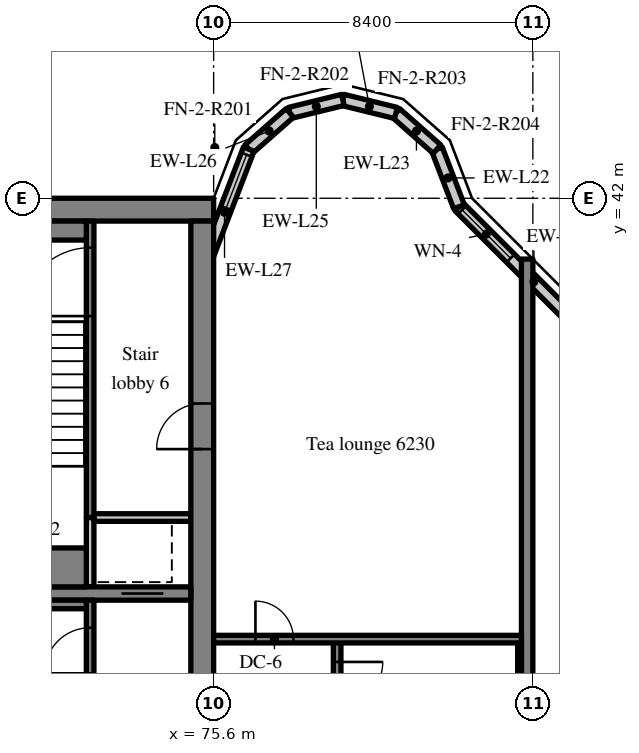
"""IFC4 building model, lengths in metres.
Left out: names, types, materials, properties, quantities, classifications, styles, units other than length and angle.
Written with IfcOpenShell. Run it as: python <this file> out.ifc"""

import sys

from ifc_helpers import new_model, si_unit, direction, frame, frame_2d, origin, place, context, subcontext, project, spatial, rectangle, extrude, source, transform, mapped, element, fill, save


model = new_model("IFC4")
c1 = context("Model", 3, precision=1e-05, world=origin(), true_north=direction((0.0, 1.0)))
c2 = subcontext(c1, "Body", "Model", "MODEL_VIEW")
j1 = project(units=[si_unit("LENGTHUNIT", "METRE"), si_unit("PLANEANGLEUNIT", "RADIAN")], contexts=[c1])
p1 = place(None, origin())
s1 = spatial("IfcSite", under=j1, at=p1, CompositionType="ELEMENT")
p2 = place(p1, origin())
s2 = spatial("IfcBuilding", under=s1, at=p2, CompositionType="ELEMENT")
p3 = place(p2, frame((0.0, 0.0, 256.9)))
s3 = spatial("IfcBuildingStorey", under=s2, at=p3, CompositionType="ELEMENT", Elevation=256.9)
m1 = source(origin(), c2, "Body", "SweptSolid", [
    extrude(rectangle(XDim=50.4, YDim=0.6, at=frame_2d((25.2, 0.0))), origin(), (0.0, 0.0, 1.0), 3.62),
])
p4 = place(p3, frame((25.2, 41.7, 0.0), z_axis=(0.0, 0.0, 1.0), x_axis=(1.0, 0.0, 0.0)))
e1 = element("IfcWall", 1, at=p4, inside=s3, PredefinedType="SHEAR", context=c2, shape_type="MappedRepresentation", body=[
    mapped(m1, transform((0.0, 0.0, 0.0), scale=1.0)),
])
m2 = source(origin(), c2, "Body", "SweptSolid", [
    extrude(rectangle(XDim=18.8, YDim=0.6, at=frame_2d((9.4, 0.0))), origin(), (0.0, 0.0, 1.0), 3.62),
])
p5 = place(p3, frame((75.3, 22.6, 0.0), z_axis=(0.0, 0.0, 1.0), x_axis=(0.0, 1.0, 0.0)))
e2 = element("IfcWall", 2, at=p5, inside=s3, PredefinedType="SHEAR", context=c2, shape_type="MappedRepresentation", body=[
    mapped(m2, transform((0.0, 0.0, 0.0), scale=1.0)),
])
m3 = source(origin(), c2, "Body", "SweptSolid", [
    extrude(rectangle(XDim=1.2, YDim=2.1, at=frame_2d((0.6, 1.05))), frame((0.0, 0.31, 0.0), z_axis=(0.0, -1.0, 0.0), x_axis=(1.0, 0.0, 0.0)), (0.0, 0.0, 1.0), 0.62),
])
p6 = place(p5, frame((12.8, 0.0, 0.0)))
e3 = element("IfcOpeningElement", 3, at=p6, cuts=e2, PredefinedType="OPENING", context=c2, shape_type="MappedRepresentation", body=[
    mapped(m3, transform((0.0, 0.0, 0.0), scale=1.0)),
])
m4 = source(origin(), c2, "Body", "SweptSolid", [
    extrude(rectangle(XDim=7.625, YDim=0.35, at=frame_2d((3.812, 0.0))), origin(), (0.0, 0.0, 1.0), 3.62),
])
p7 = place(p3, frame((67.375, 31.6, 0.0), z_axis=(0.0, 0.0, 1.0), x_axis=(1.0, 0.0, 0.0)))
e4 = element("IfcWall", 4, at=p7, inside=s3, PredefinedType="SHEAR", context=c2, shape_type="MappedRepresentation", body=[
    mapped(m4, transform((0.0, 0.0, 0.0), scale=1.0)),
])
m5 = source(origin(), c2, "Body", "SweptSolid", [
    extrude(rectangle(XDim=1.1, YDim=2.1, at=frame_2d((0.55, 1.05))), frame((0.0, 0.185, 0.0), z_axis=(0.0, -1.0, 0.0), x_axis=(1.0, 0.0, 0.0)), (0.0, 0.0, 1.0), 0.37),
])
p8 = place(p7, frame((5.8, 0.0, 0.0)))
e5 = element("IfcOpeningElement", 5, at=p8, cuts=e4, PredefinedType="OPENING", context=c2, shape_type="MappedRepresentation", body=[
    mapped(m5, transform((0.0, 0.0, 0.0), scale=1.0)),
])
m6 = source(origin(), c2, "Body", "SweptSolid", [
    extrude(rectangle(XDim=18.4, YDim=0.3, at=frame_2d((9.2, 0.0))), origin(), (0.0, 0.0, 1.0), 3.62),
])
p9 = place(p3, frame((83.85, 22.0, 0.0), z_axis=(0.0, 0.0, 1.0), x_axis=(0.0, 1.0, 0.0)))
e6 = element("IfcWall", 6, at=p9, inside=s3, PredefinedType="SHEAR", context=c2, shape_type="MappedRepresentation", body=[
    mapped(m6, transform((0.0, 0.0, 0.0), scale=1.0)),
])
m7 = source(origin(), c2, "Body", "SweptSolid", [
    extrude(rectangle(XDim=5.576, YDim=0.3, at=frame_2d((2.788, 0.0))), origin(), (0.0, 0.0, 1.0), 3.62),
])
p10 = place(p3, frame((86.0, 37.834, 0.0), z_axis=(0.0, 0.0, 1.0), x_axis=(-0.707106781187, 0.707106781187, 0.0)))
e7 = element("IfcWall", 7, at=p10, inside=s3, PredefinedType="SOLIDWALL", context=c2, shape_type="MappedRepresentation", body=[
    mapped(m7, transform((0.0, 0.0, 0.0), scale=1.0)),
])
m8 = source(origin(), c2, "Body", "SweptSolid", [
    extrude(rectangle(XDim=1.8, YDim=1.5, at=frame_2d((0.9, 0.75))), frame((0.0, 0.16, 0.0), z_axis=(0.0, -1.0, 0.0), x_axis=(1.0, 0.0, 0.0)), (0.0, 0.0, 1.0), 0.32),
])
p11 = place(p10, frame((3.658, 0.0, 0.9)))
e8 = element("IfcOpeningElement", 8, at=p11, cuts=e7, PredefinedType="OPENING", context=c2, shape_type="MappedRepresentation", body=[
    mapped(m8, transform((0.0, 0.0, 0.0), scale=1.0)),
])
m9 = source(origin(), c2, "Body", "SweptSolid", [
    extrude(rectangle(XDim=1.622, YDim=0.3, at=frame_2d((0.811, 0.0))), origin(), (0.0, 0.0, 1.0), 3.62),
])
p12 = place(p3, frame((82.057, 41.777, 0.0), z_axis=(0.0, 0.0, 1.0), x_axis=(-0.357778527068, 0.933806471154, 0.0)))
e9 = element("IfcWall", 9, at=p12, inside=s3, PredefinedType="SOLIDWALL", context=c2, shape_type="MappedRepresentation", body=[
    mapped(m9, transform((0.0, 0.0, 0.0), scale=1.0)),
])
m10 = source(origin(), c2, "Body", "SweptSolid", [
    extrude(rectangle(XDim=1.44, YDim=0.3, at=frame_2d((0.72, 0.0))), origin(), (0.0, 0.0, 1.0), 3.62),
])
p13 = place(p3, frame((81.477, 43.292, 0.0), z_axis=(0.0, 0.0, 1.0), x_axis=(-0.74957555648, 0.661918790432, 0.0)))
e10 = element("IfcWall", 10, at=p13, inside=s3, PredefinedType="SOLIDWALL", context=c2, shape_type="MappedRepresentation", body=[
    mapped(m10, transform((0.0, 0.0, 0.0), scale=1.0)),
])
m11 = source(origin(), c2, "Body", "SweptSolid", [
    extrude(rectangle(XDim=1.439, YDim=0.3, at=frame_2d((0.719, 0.0))), origin(), (0.0, 0.0, 1.0), 3.62),
])
for number, where, z_axis, x_axis in (
    (11, (80.397, 44.245, 0.0), (0.0, 0.0, 1.0), (-0.971, 0.238, 0.0)),
    (12, (79.0, 44.588, 0.0), (0.0, 0.0, 1.0), (-0.971, -0.238, 0.0)),
):
    element("IfcWall", number, at=place(p3, frame(where, z_axis=z_axis, x_axis=x_axis)), inside=s3, PredefinedType="SOLIDWALL", context=c2, shape_type="MappedRepresentation", body=[
        mapped(m11, transform((0.0, 0.0, 0.0), scale=1.0)),
    ])
p14 = place(p3, frame((77.603, 44.245, 0.0), z_axis=(0.0, 0.0, 1.0), x_axis=(-0.74957555648, -0.661918790432, 0.0)))
e13 = element("IfcWall", 13, at=p14, inside=s3, PredefinedType="SOLIDWALL", context=c2, shape_type="MappedRepresentation", body=[
    mapped(m10, transform((0.0, 0.0, 0.0), scale=1.0)),
])
m12 = source(origin(), c2, "Body", "SweptSolid", [
    extrude(rectangle(XDim=3.559, YDim=0.3, at=frame_2d((1.78, 0.0))), origin(), (0.0, 0.0, 1.0), 3.62),
])
p15 = place(p3, frame((76.523, 43.292, 0.0), z_axis=(0.0, 0.0, 1.0), x_axis=(-0.35779745313, -0.933799219604, 0.0)))
e14 = element("IfcWall", 14, at=p15, inside=s3, PredefinedType="SOLIDWALL", context=c2, shape_type="MappedRepresentation", body=[
    mapped(m12, transform((0.0, 0.0, 0.0), scale=1.0)),
])
m13 = source(origin(), c2, "Body", "SweptSolid", [
    extrude(rectangle(XDim=1.5, YDim=2.0, at=frame_2d((0.75, 1.0))), frame((0.0, 0.16, 0.0), z_axis=(0.0, -1.0, 0.0), x_axis=(1.0, 0.0, 0.0)), (0.0, 0.0, 1.0), 0.32),
])
p16 = place(p15, frame((0.156, 0.0, 0.9)))
e15 = element("IfcOpeningElement", 15, at=p16, cuts=e14, PredefinedType="OPENING", context=c2, shape_type="MappedRepresentation", body=[
    mapped(m13, transform((0.0, 0.0, 0.0), scale=1.0)),
])
m14 = source(origin(), c2, "Body", "SweptSolid", [
    extrude(rectangle(XDim=8.825, YDim=0.2, at=frame_2d((4.413, 0.0))), origin(), (0.0, 0.0, 1.0), 3.62),
])
p17 = place(p3, frame((72.35, 22.6, 0.0), z_axis=(0.0, 0.0, 1.0), x_axis=(0.0, 1.0, 0.0)))
e16 = element("IfcWall", 16, at=p17, inside=s3, PredefinedType="SOLIDWALL", context=c2, shape_type="MappedRepresentation", body=[
    mapped(m14, transform((0.0, 0.0, 0.0), scale=1.0)),
])
m15 = source(origin(), c2, "Body", "SweptSolid", [
    extrude(rectangle(XDim=1.2, YDim=2.1, at=frame_2d((0.6, 1.05))), frame((0.0, 0.11, 0.0), z_axis=(0.0, -1.0, 0.0), x_axis=(1.0, 0.0, 0.0)), (0.0, 0.0, 1.0), 0.22),
])
p18 = place(p17, frame((6.9, 0.0, 0.0)))
e17 = element("IfcOpeningElement", 17, at=p18, cuts=e16, PredefinedType="OPENING", context=c2, shape_type="MappedRepresentation", body=[
    mapped(m15, transform((0.0, 0.0, 0.0), scale=1.0)),
])
m16 = source(origin(), c2, "Body", "SweptSolid", [
    extrude(rectangle(XDim=1.825, YDim=0.2, at=frame_2d((0.913, 0.0))), origin(), (0.0, 0.0, 1.0), 3.62),
])
p19 = place(p3, frame((72.35, 31.775, 0.0), z_axis=(0.0, 0.0, 1.0), x_axis=(0.0, 1.0, 0.0)))
e18 = element("IfcWall", 18, at=p19, inside=s3, PredefinedType="SOLIDWALL", context=c2, shape_type="MappedRepresentation", body=[
    mapped(m16, transform((0.0, 0.0, 0.0), scale=1.0)),
])
m17 = source(origin(), c2, "Body", "SweptSolid", [
    extrude(rectangle(XDim=2.55, YDim=0.2, at=frame_2d((1.275, 0.0))), origin(), (0.0, 0.0, 1.0), 3.62),
])
p20 = place(p3, frame((72.45, 33.6, 0.0), z_axis=(0.0, 0.0, 1.0), x_axis=(1.0, 0.0, 0.0)))
e19 = element("IfcWall", 19, at=p20, inside=s3, PredefinedType="SOLIDWALL", context=c2, shape_type="MappedRepresentation", body=[
    mapped(m17, transform((0.0, 0.0, 0.0), scale=1.0)),
])
m18 = source(origin(), c2, "Body", "SweptSolid", [
    extrude(rectangle(XDim=7.8, YDim=0.2, at=frame_2d((3.9, 0.0))), origin(), (0.0, 0.0, 1.0), 3.62),
])
p21 = place(p3, frame((72.35, 33.6, 0.0), z_axis=(0.0, 0.0, 1.0), x_axis=(0.0, 1.0, 0.0)))
e20 = element("IfcWall", 20, at=p21, inside=s3, PredefinedType="SOLIDWALL", context=c2, shape_type="MappedRepresentation", body=[
    mapped(m18, transform((0.0, 0.0, 0.0), scale=1.0)),
])
m19 = source(origin(), c2, "Body", "SweptSolid", [
    extrude(rectangle(XDim=1.8, YDim=2.1, at=frame_2d((0.9, 1.05))), frame((0.0, 0.11, 0.0), z_axis=(0.0, -1.0, 0.0), x_axis=(1.0, 0.0, 0.0)), (0.0, 0.0, 1.0), 0.22),
])
p22 = place(p21, frame((5.3, 0.0, 0.0)))
e21 = element("IfcOpeningElement", 21, at=p22, cuts=e20, PredefinedType="OPENING", context=c2, shape_type="MappedRepresentation", body=[
    mapped(m19, transform((0.0, 0.0, 0.0), scale=1.0)),
])
m20 = source(origin(), c2, "Body", "SweptSolid", [
    extrude(rectangle(XDim=8.3, YDim=0.2, at=frame_2d((4.15, 0.0))), origin(), (0.0, 0.0, 1.0), 3.62),
])
p23 = place(p3, frame((78.85, 22.1, 0.0), z_axis=(0.0, 0.0, 1.0), x_axis=(0.0, 1.0, 0.0)))
e22 = element("IfcWall", 22, at=p23, inside=s3, PredefinedType="SOLIDWALL", context=c2, shape_type="MappedRepresentation", body=[
    mapped(m20, transform((0.0, 0.0, 0.0), scale=1.0)),
])
p24 = place(p23, frame((6.5, 0.0, 0.0)))
e23 = element("IfcOpeningElement", 23, at=p24, cuts=e22, PredefinedType="OPENING", context=c2, shape_type="MappedRepresentation", body=[
    mapped(m15, transform((0.0, 0.0, 0.0), scale=1.0)),
])
m21 = source(origin(), c2, "Body", "SweptSolid", [
    extrude(rectangle(XDim=8.1, YDim=0.2, at=frame_2d((4.05, 0.0))), origin(), (0.0, 0.0, 1.0), 3.62),
])
p25 = place(p3, frame((83.7, 30.4, 0.0), z_axis=(0.0, 0.0, 1.0), x_axis=(-1.0, 0.0, 0.0)))
e24 = element("IfcWall", 24, at=p25, inside=s3, PredefinedType="SOLIDWALL", context=c2, shape_type="MappedRepresentation", body=[
    mapped(m21, transform((0.0, 0.0, 0.0), scale=1.0)),
])
m22 = source(origin(), c2, "Body", "SweptSolid", [
    extrude(rectangle(XDim=1.0, YDim=2.1, at=frame_2d((0.5, 1.05))), frame((0.0, 0.11, 0.0), z_axis=(0.0, -1.0, 0.0), x_axis=(1.0, 0.0, 0.0)), (0.0, 0.0, 1.0), 0.22),
])
p26 = place(p25, frame((6.0, 0.0, 0.0)))
e25 = element("IfcOpeningElement", 25, at=p26, cuts=e24, PredefinedType="OPENING", context=c2, shape_type="MappedRepresentation", body=[
    mapped(m22, transform((0.0, 0.0, 0.0), scale=1.0)),
])
m23 = source(origin(), c2, "Body", "SweptSolid", [
    extrude(rectangle(XDim=4.875, YDim=0.225, at=frame_2d((2.438, 0.0))), origin(), (0.0, 0.0, 1.0), 3.62),
])
p27 = place(p3, frame((67.375, 31.312, 0.0), z_axis=(0.0, 0.0, 1.0), x_axis=(1.0, 0.0, 0.0)))
e26 = element("IfcWall", 26, at=p27, inside=s3, PredefinedType="SOLIDWALL", context=c2, shape_type="MappedRepresentation", body=[
    mapped(m23, transform((0.0, 0.0, 0.0), scale=1.0)),
])
m24 = source(origin(), c2, "Body", "SweptSolid", [
    extrude(rectangle(XDim=4.875, YDim=0.5, at=frame_2d((2.438, 0.0))), origin(), (0.0, 0.0, 1.0), 3.62),
])
p28 = place(p3, frame((67.375, 41.15, 0.0), z_axis=(0.0, 0.0, 1.0), x_axis=(1.0, 0.0, 0.0)))
e27 = element("IfcWall", 27, at=p28, inside=s3, PredefinedType="SOLIDWALL", context=c2, shape_type="MappedRepresentation", body=[
    mapped(m24, transform((0.0, 0.0, 0.0), scale=1.0)),
])
m25 = source(origin(), c2, "Body", "SweptSolid", [
    extrude(rectangle(XDim=4.875, YDim=1.025, at=frame_2d((2.438, 0.0))), origin(), (0.0, 0.0, 1.0), 3.62),
])
p29 = place(p3, frame((67.375, 32.287, 0.0), z_axis=(0.0, 0.0, 1.0), x_axis=(1.0, 0.0, 0.0)))
e28 = element("IfcWall", 28, at=p29, inside=s3, PredefinedType="SOLIDWALL", context=c2, shape_type="MappedRepresentation", body=[
    mapped(m25, transform((0.0, 0.0, 0.0), scale=1.0)),
])
m26 = source(origin(), c2, "Body", "SweptSolid", [
    extrude(rectangle(XDim=8.1, YDim=0.1, at=frame_2d((4.05, 0.0))), origin(), (0.0, 0.0, 1.0), 3.62),
])
p30 = place(p3, frame((83.65, 22.2, 0.0), z_axis=(0.0, 0.0, 1.0), x_axis=(0.0, 1.0, 0.0)))
e29 = element("IfcWall", 29, at=p30, inside=s3, PredefinedType="SOLIDWALL", context=c2, shape_type="MappedRepresentation", body=[
    mapped(m26, transform((0.0, 0.0, 0.0), scale=1.0)),
])
m27 = source(origin(), c2, "Body", "SweptSolid", [
    extrude(rectangle(XDim=1.8, YDim=1.5, at=frame_2d((0.9, 0.75))), frame((0.0, 0.03, 0.0), z_axis=(0.0, -1.0, 0.0), x_axis=(1.0, 0.0, 0.0)), (0.0, 0.0, 1.0), 0.06),
])
p31 = place(p11, origin())
e30 = element("IfcWindow", 30, at=p31, inside=s3, PartitioningType="SINGLE_PANEL", PredefinedType="WINDOW", context=c2, shape_type="MappedRepresentation", body=[
    mapped(m27, transform((0.0, 0.0, 0.0), scale=1.0)),
])
fill(e8, e30)
m28 = source(origin(), c2, "Body", "SweptSolid", [
    extrude(rectangle(XDim=1.5, YDim=2.0, at=frame_2d((0.75, 1.0))), frame((0.0, 0.03, 0.0), z_axis=(0.0, -1.0, 0.0), x_axis=(1.0, 0.0, 0.0)), (0.0, 0.0, 1.0), 0.06),
])
p32 = place(p16, origin())
e31 = element("IfcWindow", 31, at=p32, inside=s3, PartitioningType="SINGLE_PANEL", PredefinedType="WINDOW", context=c2, shape_type="MappedRepresentation", body=[
    mapped(m28, transform((0.0, 0.0, 0.0), scale=1.0)),
])
fill(e15, e31)
m29 = source(origin(), c2, "Body", "SweptSolid", [
    extrude(rectangle(XDim=1.2, YDim=2.1, at=frame_2d((0.6, 1.05))), frame((0.0, 0.025, 0.0), z_axis=(0.0, -1.0, 0.0), x_axis=(1.0, 0.0, 0.0)), (0.0, 0.0, 1.0), 0.05),
])
p33 = place(p18, origin())
e32 = element("IfcDoor", 32, at=p33, inside=s3, OperationType="SINGLE_SWING_LEFT", PredefinedType="DOOR", context=c2, shape_type="MappedRepresentation", body=[
    mapped(m29, transform((0.0, 0.0, 0.0), scale=1.0)),
])
fill(e17, e32)
m30 = source(origin(), c2, "Body", "SweptSolid", [
    extrude(rectangle(XDim=1.1, YDim=2.1, at=frame_2d((0.55, 1.05))), frame((0.0, 0.025, 0.0), z_axis=(0.0, -1.0, 0.0), x_axis=(1.0, 0.0, 0.0)), (0.0, 0.0, 1.0), 0.05),
])
p34 = place(p8, origin())
e33 = element("IfcDoor", 33, at=p34, inside=s3, OperationType="SLIDING_TO_RIGHT", PredefinedType="DOOR", context=c2, shape_type="MappedRepresentation", body=[
    mapped(m30, transform((0.0, 0.0, 0.0), scale=1.0)),
])
fill(e5, e33)
m31 = source(origin(), c2, "Body", "SweptSolid", [
    extrude(rectangle(XDim=1.8, YDim=2.1, at=frame_2d((0.9, 1.05))), frame((0.0, 0.025, 0.0), z_axis=(0.0, -1.0, 0.0), x_axis=(1.0, 0.0, 0.0)), (0.0, 0.0, 1.0), 0.05),
])
p35 = place(p22, origin())
e34 = element("IfcDoor", 34, at=p35, inside=s3, OperationType="SINGLE_SWING_LEFT", PredefinedType="DOOR", context=c2, shape_type="MappedRepresentation", body=[
    mapped(m31, transform((0.0, 0.0, 0.0), scale=1.0)),
])
fill(e21, e34)
p36 = place(p6, origin())
e35 = element("IfcDoor", 35, at=p36, inside=s3, OperationType="SINGLE_SWING_LEFT", PredefinedType="DOOR", context=c2, shape_type="MappedRepresentation", body=[
    mapped(m29, transform((0.0, 0.0, 0.0), scale=1.0)),
])
fill(e3, e35)
p37 = place(p24, origin())
e36 = element("IfcDoor", 36, at=p37, inside=s3, OperationType="SINGLE_SWING_RIGHT", PredefinedType="DOOR", context=c2, shape_type="MappedRepresentation", body=[
    mapped(m29, transform((0.0, 0.0, 0.0), scale=1.0)),
])
fill(e23, e36)
m32 = source(origin(), c2, "Body", "SweptSolid", [
    extrude(rectangle(XDim=1.0, YDim=2.1, at=frame_2d((0.5, 1.05))), frame((0.0, 0.025, 0.0), z_axis=(0.0, -1.0, 0.0), x_axis=(1.0, 0.0, 0.0)), (0.0, 0.0, 1.0), 0.05),
])
p38 = place(p26, origin())
e37 = element("IfcDoor", 37, at=p38, inside=s3, OperationType="SINGLE_SWING_RIGHT", PredefinedType="DOOR", context=c2, shape_type="MappedRepresentation", body=[
    mapped(m32, transform((0.0, 0.0, 0.0), scale=1.0)),
])
fill(e25, e37)
save(model, sys.argv[1])
